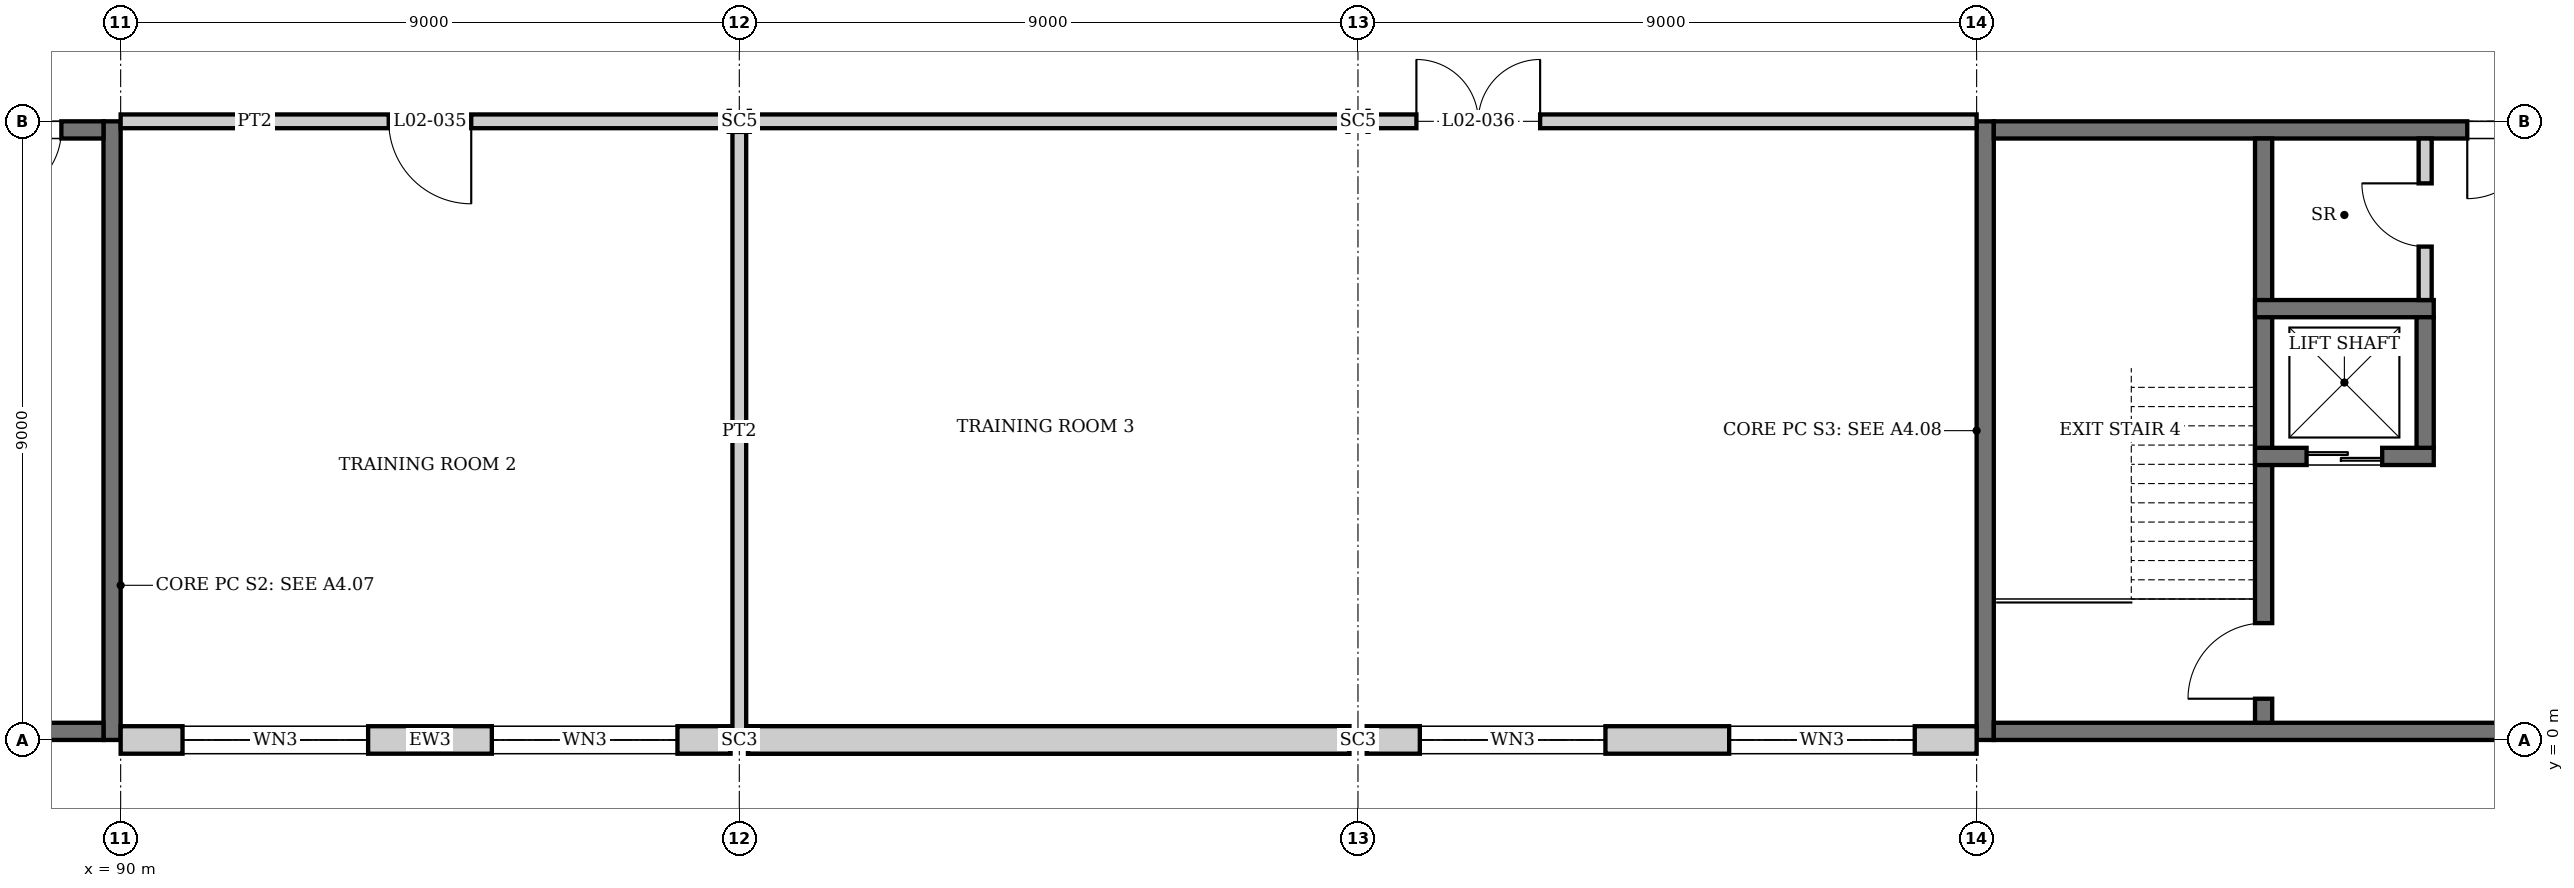
"""IFC4 building model, lengths in metres.
Left out: names, types, materials, properties, quantities, classifications, styles, units other than length and angle.
Written with IfcOpenShell. Run it as: python <this file> out.ifc"""

import sys

from ifc_helpers import new_model, si_unit, direction, frame, frame_2d, origin, origin_2d, place, context, subcontext, project, spatial, polyline, rectangle, i_section, outline, extrude, element, fill, save


model = new_model("IFC4")
c1 = context("Model", 3, precision=1e-05, world=origin(), true_north=direction((0.0, 1.0)))
c2 = subcontext(c1, "Body", "Model", "MODEL_VIEW")
j1 = project(units=[si_unit("LENGTHUNIT", "METRE"), si_unit("PLANEANGLEUNIT", "RADIAN")], contexts=[c1])
p1 = place(None, origin())
s1 = spatial("IfcSite", under=j1, at=p1, CompositionType="ELEMENT")
p2 = place(p1, origin())
s2 = spatial("IfcBuilding", under=s1, at=p2, CompositionType="ELEMENT")
p3 = place(p2, frame((0.0, 0.0, 10.5)))
s3 = spatial("IfcBuildingStorey", under=s2, at=p3, CompositionType="ELEMENT", Elevation=10.5)
p4 = place(p3, frame((99.0, 0.0, 0.0), z_axis=(0.0, 0.0, 1.0), x_axis=(0.0, 1.0, 0.0)))
e1 = element("IfcColumn", 1, at=p4, inside=s3, PredefinedType="COLUMN", context=c2, shape_type="SweptSolid", body=[
    extrude(i_section(OverallWidth=0.254, OverallDepth=0.254, WebThickness=0.009, FlangeThickness=0.014, at=origin_2d()), origin(), (0.0, 0.0, 1.0), 4.5),
])
p5 = place(p3, frame((99.0, 9.0, 0.0), z_axis=(0.0, 0.0, 1.0), x_axis=(0.0, 1.0, 0.0)))
e2 = element("IfcColumn", 2, at=p5, inside=s3, PredefinedType="COLUMN", context=c2, shape_type="SweptSolid", body=[
    extrude(i_section(OverallWidth=0.305, OverallDepth=0.308, WebThickness=0.01, FlangeThickness=0.015, at=origin_2d()), origin(), (0.0, 0.0, 1.0), 4.5),
])
p6 = place(p3, frame((108.0, 0.0, 0.0), z_axis=(0.0, 0.0, 1.0), x_axis=(0.0, 1.0, 0.0)))
e3 = element("IfcColumn", 3, at=p6, inside=s3, PredefinedType="COLUMN", context=c2, shape_type="SweptSolid", body=[
    extrude(i_section(OverallWidth=0.254, OverallDepth=0.254, WebThickness=0.009, FlangeThickness=0.014, at=origin_2d()), origin(), (0.0, 0.0, 1.0), 4.5),
])
p7 = place(p3, frame((108.0, 9.0, 0.0), z_axis=(0.0, 0.0, 1.0), x_axis=(0.0, 1.0, 0.0)))
e4 = element("IfcColumn", 4, at=p7, inside=s3, PredefinedType="COLUMN", context=c2, shape_type="SweptSolid", body=[
    extrude(i_section(OverallWidth=0.305, OverallDepth=0.308, WebThickness=0.01, FlangeThickness=0.015, at=origin_2d()), origin(), (0.0, 0.0, 1.0), 4.5),
])
p8 = place(p3, frame((89.875, 0.0, 0.0), z_axis=(0.0, 0.0, 1.0), x_axis=(0.0, 1.0, 0.0)))
e5 = element("IfcWall", 5, at=p8, inside=s3, PredefinedType="SHEAR", context=c2, shape_type="SweptSolid", body=[
    extrude(rectangle(XDim=9.0, YDim=0.25, at=frame_2d((4.5, 0.0))), origin(), (0.0, 0.0, 1.0), 4.35),
])
p9 = place(p3, frame((81.25, 0.125, 0.0), z_axis=(0.0, 0.0, 1.0), x_axis=(1.0, 0.0, 0.0)))
e6 = element("IfcWall", 6, at=p9, inside=s3, PredefinedType="SHEAR", context=c2, shape_type="SweptSolid", body=[
    extrude(rectangle(XDim=8.5, YDim=0.25, at=frame_2d((4.25, 0.0))), origin(), (0.0, 0.0, 1.0), 4.35),
])
p10 = place(p3, frame((81.25, 8.875, 0.0), z_axis=(0.0, 0.0, 1.0), x_axis=(1.0, 0.0, 0.0)))
e7 = element("IfcWall", 7, at=p10, inside=s3, PredefinedType="SHEAR", context=c2, shape_type="SweptSolid", body=[
    extrude(rectangle(XDim=8.5, YDim=0.25, at=frame_2d((4.25, 0.0))), origin(), (0.0, 0.0, 1.0), 4.35),
])
p11 = place(p10, frame((6.887, 0.0, 0.0)))
e8 = element("IfcOpeningElement", 8, at=p11, cuts=e7, PredefinedType="OPENING", context=c2, shape_type="SweptSolid", body=[
    extrude(rectangle(XDim=1.0, YDim=2.1, at=frame_2d((0.5, 1.05))), frame((0.0, 0.135, 0.0), z_axis=(0.0, -1.0, 0.0), x_axis=(1.0, 0.0, 0.0)), (0.0, 0.0, 1.0), 0.27),
])
p12 = place(p3, frame((117.125, 0.0, 0.0), z_axis=(0.0, 0.0, 1.0), x_axis=(0.0, 1.0, 0.0)))
e9 = element("IfcWall", 9, at=p12, inside=s3, PredefinedType="SHEAR", context=c2, shape_type="SweptSolid", body=[
    extrude(rectangle(XDim=9.0, YDim=0.25, at=frame_2d((4.5, 0.0))), origin(), (0.0, 0.0, 1.0), 4.35),
])
p13 = place(p3, frame((117.25, 0.125, 0.0), z_axis=(0.0, 0.0, 1.0), x_axis=(1.0, 0.0, 0.0)))
e10 = element("IfcWall", 10, at=p13, inside=s3, PredefinedType="SHEAR", context=c2, shape_type="SweptSolid", body=[
    extrude(rectangle(XDim=8.5, YDim=0.25, at=frame_2d((4.25, 0.0))), origin(), (0.0, 0.0, 1.0), 4.35),
])
p14 = place(p3, frame((117.25, 8.875, 0.0), z_axis=(0.0, 0.0, 1.0), x_axis=(1.0, 0.0, 0.0)))
e11 = element("IfcWall", 11, at=p14, inside=s3, PredefinedType="SHEAR", context=c2, shape_type="SweptSolid", body=[
    extrude(rectangle(XDim=8.5, YDim=0.25, at=frame_2d((4.25, 0.0))), origin(), (0.0, 0.0, 1.0), 4.35),
])
p15 = place(p14, frame((6.887, 0.0, 0.0)))
e12 = element("IfcOpeningElement", 12, at=p15, cuts=e11, PredefinedType="OPENING", context=c2, shape_type="SweptSolid", body=[
    extrude(rectangle(XDim=1.0, YDim=2.1, at=frame_2d((0.5, 1.05))), frame((0.0, 0.135, 0.0), z_axis=(0.0, -1.0, 0.0), x_axis=(1.0, 0.0, 0.0)), (0.0, 0.0, 1.0), 0.27),
])
p16 = place(p3, frame((90.0, 0.0, 0.0), z_axis=(0.0, 0.0, 1.0), x_axis=(1.0, 0.0, 0.0)))
e13 = element("IfcWall", 13, at=p16, inside=s3, PredefinedType="SOLIDWALL", context=c2, shape_type="SweptSolid", body=[
    extrude(rectangle(XDim=8.873, YDim=0.4, at=frame_2d((4.437, 0.0))), origin(), (0.0, 0.0, 1.0), 3.991),
])
p17 = place(p16, frame((0.9, 0.0, 1.5)))
e14 = element("IfcOpeningElement", 14, at=p17, cuts=e13, PredefinedType="OPENING", context=c2, shape_type="SweptSolid", body=[
    extrude(rectangle(XDim=2.7, YDim=1.5, at=frame_2d((1.35, 0.75))), frame((0.0, 0.21, 0.0), z_axis=(0.0, -1.0, 0.0), x_axis=(1.0, 0.0, 0.0)), (0.0, 0.0, 1.0), 0.42),
])
p18 = place(p16, frame((5.4, 0.0, 1.5)))
e15 = element("IfcOpeningElement", 15, at=p18, cuts=e13, PredefinedType="OPENING", context=c2, shape_type="SweptSolid", body=[
    extrude(rectangle(XDim=2.7, YDim=1.5, at=frame_2d((1.35, 0.75))), frame((0.0, 0.21, 0.0), z_axis=(0.0, -1.0, 0.0), x_axis=(1.0, 0.0, 0.0)), (0.0, 0.0, 1.0), 0.42),
])
p19 = place(p3, frame((99.127, 0.0, 0.0), z_axis=(0.0, 0.0, 1.0), x_axis=(1.0, 0.0, 0.0)))
e16 = element("IfcWall", 16, at=p19, inside=s3, PredefinedType="SOLIDWALL", context=c2, shape_type="SweptSolid", body=[
    extrude(outline(polyline([(8.746, 0.0), (0.0, 0.0), (0.0, 0.5), (0.048, 0.38), (8.746, 3.86), (8.746, 0.0)])), frame((0.0, 0.2, 0.0), z_axis=(0.0, -1.0, 0.0), x_axis=(1.0, 0.0, 0.0)), (0.0, 0.0, 1.0), 0.4),
])
p20 = place(p3, frame((99.127, 0.0, 0.0), z_axis=(0.0, 0.0, 1.0), x_axis=(1.0, 0.0, 0.0)))
e17 = element("IfcWall", 17, at=p20, inside=s3, PredefinedType="SOLIDWALL", context=c2, shape_type="SweptSolid", body=[
    extrude(outline(polyline([(0.0, 3.991), (8.375, 3.991), (0.0, 0.64), (0.0, 3.991)])), frame((0.0, 0.2, 0.0), z_axis=(0.0, -1.0, 0.0), x_axis=(1.0, 0.0, 0.0)), (0.0, 0.0, 1.0), 0.4),
])
p21 = place(p3, frame((108.127, 0.0, 0.0), z_axis=(0.0, 0.0, 1.0), x_axis=(1.0, 0.0, 0.0)))
e18 = element("IfcWall", 18, at=p21, inside=s3, PredefinedType="SOLIDWALL", context=c2, shape_type="SweptSolid", body=[
    extrude(rectangle(XDim=8.873, YDim=0.4, at=frame_2d((4.437, 0.0))), origin(), (0.0, 0.0, 1.0), 3.991),
])
p22 = place(p21, frame((0.773, 0.0, 1.5)))
e19 = element("IfcOpeningElement", 19, at=p22, cuts=e18, PredefinedType="OPENING", context=c2, shape_type="SweptSolid", body=[
    extrude(rectangle(XDim=2.7, YDim=1.5, at=frame_2d((1.35, 0.75))), frame((0.0, 0.21, 0.0), z_axis=(0.0, -1.0, 0.0), x_axis=(1.0, 0.0, 0.0)), (0.0, 0.0, 1.0), 0.42),
])
p23 = place(p21, frame((5.273, 0.0, 1.5)))
e20 = element("IfcOpeningElement", 20, at=p23, cuts=e18, PredefinedType="OPENING", context=c2, shape_type="SweptSolid", body=[
    extrude(rectangle(XDim=2.7, YDim=1.5, at=frame_2d((1.35, 0.75))), frame((0.0, 0.21, 0.0), z_axis=(0.0, -1.0, 0.0), x_axis=(1.0, 0.0, 0.0)), (0.0, 0.0, 1.0), 0.42),
])
p24 = place(p3, frame((121.175, 0.25, 0.0), z_axis=(0.0, 0.0, 1.0), x_axis=(0.0, 1.0, 0.0)))
e21 = element("IfcWall", 21, at=p24, inside=s3, PredefinedType="SOLIDWALL", context=c2, shape_type="SweptSolid", body=[
    extrude(rectangle(XDim=8.5, YDim=0.25, at=frame_2d((4.25, 0.0))), origin(), (0.0, 0.0, 1.0), 4.35),
])
p25 = place(p24, frame((0.35, 0.0, 0.0)))
e22 = element("IfcOpeningElement", 22, at=p25, cuts=e21, PredefinedType="OPENING", context=c2, shape_type="SweptSolid", body=[
    extrude(rectangle(XDim=1.1, YDim=2.1, at=frame_2d((0.55, 1.05))), frame((0.0, 0.135, 0.0), z_axis=(0.0, -1.0, 0.0), x_axis=(1.0, 0.0, 0.0)), (0.0, 0.0, 1.0), 0.27),
])
p26 = place(p3, frame((121.05, 4.125, 0.0), z_axis=(0.0, 0.0, 1.0), x_axis=(1.0, 0.0, 0.0)))
e23 = element("IfcWall", 23, at=p26, inside=s3, PredefinedType="SOLIDWALL", context=c2, shape_type="SweptSolid", body=[
    extrude(rectangle(XDim=2.6, YDim=0.25, at=frame_2d((1.3, 0.0))), origin(), (0.0, 0.0, 1.0), 4.35),
])
p27 = place(p26, frame((0.75, 0.0, 0.0)))
e24 = element("IfcOpeningElement", 24, at=p27, cuts=e23, PredefinedType="OPENING", context=c2, shape_type="SweptSolid", body=[
    extrude(rectangle(XDim=1.1, YDim=2.1, at=frame_2d((0.55, 1.05))), frame((0.0, 0.135, 0.0), z_axis=(0.0, -1.0, 0.0), x_axis=(1.0, 0.0, 0.0)), (0.0, 0.0, 1.0), 0.27),
])
p28 = place(p3, frame((121.05, 6.275, 0.0), z_axis=(0.0, 0.0, 1.0), x_axis=(1.0, 0.0, 0.0)))
e25 = element("IfcWall", 25, at=p28, inside=s3, PredefinedType="SOLIDWALL", context=c2, shape_type="SweptSolid", body=[
    extrude(rectangle(XDim=2.6, YDim=0.25, at=frame_2d((1.3, 0.0))), origin(), (0.0, 0.0, 1.0), 4.35),
])
p29 = place(p3, frame((123.525, 4.25, 0.0), z_axis=(0.0, 0.0, 1.0), x_axis=(0.0, 1.0, 0.0)))
e26 = element("IfcWall", 26, at=p29, inside=s3, PredefinedType="SOLIDWALL", context=c2, shape_type="SweptSolid", body=[
    extrude(rectangle(XDim=1.9, YDim=0.25, at=frame_2d((0.95, 0.0))), origin(), (0.0, 0.0, 1.0), 4.35),
])
p30 = place(p3, frame((90.0, 9.0, 0.0), z_axis=(0.0, 0.0, 1.0), x_axis=(1.0, 0.0, 0.0)))
e27 = element("IfcWall", 27, at=p30, inside=s3, PredefinedType="PARTITIONING", context=c2, shape_type="SweptSolid", body=[
    extrude(rectangle(XDim=8.846, YDim=0.2, at=frame_2d((4.423, 0.0))), origin(), (0.0, 0.0, 1.0), 2.414),
])
p31 = place(p30, frame((3.9, 0.0, 0.0)))
e28 = element("IfcOpeningElement", 28, at=p31, cuts=e27, PredefinedType="OPENING", context=c2, shape_type="SweptSolid", body=[
    extrude(rectangle(XDim=1.2, YDim=2.1, at=frame_2d((0.6, 1.05))), frame((0.0, 0.11, 0.0), z_axis=(0.0, -1.0, 0.0), x_axis=(1.0, 0.0, 0.0)), (0.0, 0.0, 1.0), 0.22),
])
p32 = place(p3, frame((99.154, 9.0, 0.0), z_axis=(0.0, 0.0, 1.0), x_axis=(1.0, 0.0, 0.0)))
e29 = element("IfcWall", 29, at=p32, inside=s3, PredefinedType="PARTITIONING", context=c2, shape_type="SweptSolid", body=[
    extrude(rectangle(XDim=8.692, YDim=0.2, at=frame_2d((4.346, 0.0))), origin(), (0.0, 0.0, 1.0), 2.414),
])
p33 = place(p3, frame((108.154, 9.0, 0.0), z_axis=(0.0, 0.0, 1.0), x_axis=(1.0, 0.0, 0.0)))
e30 = element("IfcWall", 30, at=p33, inside=s3, PredefinedType="PARTITIONING", context=c2, shape_type="SweptSolid", body=[
    extrude(rectangle(XDim=8.846, YDim=0.2, at=frame_2d((4.423, 0.0))), origin(), (0.0, 0.0, 1.0), 2.414),
])
p34 = place(p33, frame((0.696, 0.0, 0.0)))
e31 = element("IfcOpeningElement", 31, at=p34, cuts=e30, PredefinedType="OPENING", context=c2, shape_type="SweptSolid", body=[
    extrude(rectangle(XDim=1.8, YDim=2.1, at=frame_2d((0.9, 1.05))), frame((0.0, 0.11, 0.0), z_axis=(0.0, -1.0, 0.0), x_axis=(1.0, 0.0, 0.0)), (0.0, 0.0, 1.0), 0.22),
])
p35 = place(p3, frame((99.0, 0.127, 0.0), z_axis=(0.0, 0.0, 1.0), x_axis=(0.0, 1.0, 0.0)))
e32 = element("IfcWall", 32, at=p35, inside=s3, PredefinedType="PARTITIONING", context=c2, shape_type="SweptSolid", body=[
    extrude(rectangle(XDim=8.719, YDim=0.2, at=frame_2d((4.359, 0.0))), origin(), (0.0, 0.0, 1.0), 3.998),
])
p36 = place(p3, frame((123.525, 6.4, 0.0), z_axis=(0.0, 0.0, 1.0), x_axis=(0.0, 1.0, 0.0)))
e33 = element("IfcWall", 33, at=p36, inside=s3, PredefinedType="PARTITIONING", context=c2, shape_type="SweptSolid", body=[
    extrude(rectangle(XDim=2.35, YDim=0.19, at=frame_2d((1.175, 0.0))), origin(), (0.0, 0.0, 1.0), 4.35),
])
p37 = place(p36, frame((0.778, 0.0, 0.0)))
e34 = element("IfcOpeningElement", 34, at=p37, cuts=e33, PredefinedType="OPENING", context=c2, shape_type="SweptSolid", body=[
    extrude(rectangle(XDim=0.92, YDim=2.1, at=frame_2d((0.46, 1.05))), frame((0.0, 0.105, 0.0), z_axis=(0.0, -1.0, 0.0), x_axis=(1.0, 0.0, 0.0)), (0.0, 0.0, 1.0), 0.21),
])
p38 = place(p17, origin())
e35 = element("IfcWindow", 35, at=p38, inside=s3, PartitioningType="SINGLE_PANEL", PredefinedType="WINDOW", context=c2, shape_type="SweptSolid", body=[
    extrude(rectangle(XDim=2.7, YDim=1.5, at=frame_2d((1.35, 0.75))), frame((0.0, 0.03, 0.0), z_axis=(0.0, -1.0, 0.0), x_axis=(1.0, 0.0, 0.0)), (0.0, 0.0, 1.0), 0.06),
])
fill(e14, e35)
p39 = place(p18, origin())
e36 = element("IfcWindow", 36, at=p39, inside=s3, PartitioningType="SINGLE_PANEL", PredefinedType="WINDOW", context=c2, shape_type="SweptSolid", body=[
    extrude(rectangle(XDim=2.7, YDim=1.5, at=frame_2d((1.35, 0.75))), frame((0.0, 0.03, 0.0), z_axis=(0.0, -1.0, 0.0), x_axis=(1.0, 0.0, 0.0)), (0.0, 0.0, 1.0), 0.06),
])
fill(e15, e36)
p40 = place(p22, origin())
e37 = element("IfcWindow", 37, at=p40, inside=s3, PartitioningType="SINGLE_PANEL", PredefinedType="WINDOW", context=c2, shape_type="SweptSolid", body=[
    extrude(rectangle(XDim=2.7, YDim=1.5, at=frame_2d((1.35, 0.75))), frame((0.0, 0.03, 0.0), z_axis=(0.0, -1.0, 0.0), x_axis=(1.0, 0.0, 0.0)), (0.0, 0.0, 1.0), 0.06),
])
fill(e19, e37)
p41 = place(p23, origin())
e38 = element("IfcWindow", 38, at=p41, inside=s3, PartitioningType="SINGLE_PANEL", PredefinedType="WINDOW", context=c2, shape_type="SweptSolid", body=[
    extrude(rectangle(XDim=2.7, YDim=1.5, at=frame_2d((1.35, 0.75))), frame((0.0, 0.03, 0.0), z_axis=(0.0, -1.0, 0.0), x_axis=(1.0, 0.0, 0.0)), (0.0, 0.0, 1.0), 0.06),
])
fill(e20, e38)
p42 = place(p27, origin())
e39 = element("IfcDoor", 39, at=p42, inside=s3, OperationType="DOUBLE_DOOR_SLIDING", PredefinedType="DOOR", context=c2, shape_type="SweptSolid", body=[
    extrude(rectangle(XDim=1.1, YDim=2.1, at=frame_2d((0.55, 1.05))), frame((0.0, 0.025, 0.0), z_axis=(0.0, -1.0, 0.0), x_axis=(1.0, 0.0, 0.0)), (0.0, 0.0, 1.0), 0.05),
])
fill(e24, e39)
p43 = place(p11, frame((1.0, 0.0, 0.0), z_axis=(0.0, 0.0, 1.0), x_axis=(-1.0, 0.0, 0.0)))
e40 = element("IfcDoor", 40, at=p43, inside=s3, OperationType="SINGLE_SWING_RIGHT", PredefinedType="DOOR", context=c2, shape_type="SweptSolid", body=[
    extrude(rectangle(XDim=1.0, YDim=2.1, at=frame_2d((0.5, 1.05))), frame((0.0, 0.025, 0.0), z_axis=(0.0, -1.0, 0.0), x_axis=(1.0, 0.0, 0.0)), (0.0, 0.0, 1.0), 0.05),
])
fill(e8, e40)
p44 = place(p25, origin())
e41 = element("IfcDoor", 41, at=p44, inside=s3, OperationType="SINGLE_SWING_LEFT", PredefinedType="DOOR", context=c2, shape_type="SweptSolid", body=[
    extrude(rectangle(XDim=1.1, YDim=2.1, at=frame_2d((0.55, 1.05))), frame((0.0, 0.025, 0.0), z_axis=(0.0, -1.0, 0.0), x_axis=(1.0, 0.0, 0.0)), (0.0, 0.0, 1.0), 0.05),
])
fill(e22, e41)
p45 = place(p15, frame((1.0, 0.0, 0.0), z_axis=(0.0, 0.0, 1.0), x_axis=(-1.0, 0.0, 0.0)))
e42 = element("IfcDoor", 42, at=p45, inside=s3, OperationType="SINGLE_SWING_RIGHT", PredefinedType="DOOR", context=c2, shape_type="SweptSolid", body=[
    extrude(rectangle(XDim=1.0, YDim=2.1, at=frame_2d((0.5, 1.05))), frame((0.0, 0.025, 0.0), z_axis=(0.0, -1.0, 0.0), x_axis=(1.0, 0.0, 0.0)), (0.0, 0.0, 1.0), 0.05),
])
fill(e12, e42)
p46 = place(p37, origin())
e43 = element("IfcDoor", 43, at=p46, inside=s3, OperationType="SINGLE_SWING_RIGHT", PredefinedType="DOOR", context=c2, shape_type="SweptSolid", body=[
    extrude(rectangle(XDim=0.92, YDim=2.1, at=frame_2d((0.46, 1.05))), frame((0.0, 0.025, 0.0), z_axis=(0.0, -1.0, 0.0), x_axis=(1.0, 0.0, 0.0)), (0.0, 0.0, 1.0), 0.05),
])
fill(e34, e43)
p47 = place(p31, frame((1.2, 0.0, 0.0), z_axis=(0.0, 0.0, 1.0), x_axis=(-1.0, 0.0, 0.0)))
e44 = element("IfcDoor", 44, at=p47, inside=s3, OperationType="SINGLE_SWING_LEFT", PredefinedType="DOOR", context=c2, shape_type="SweptSolid", body=[
    extrude(rectangle(XDim=1.2, YDim=2.1, at=frame_2d((0.6, 1.05))), frame((0.0, 0.025, 0.0), z_axis=(0.0, -1.0, 0.0), x_axis=(1.0, 0.0, 0.0)), (0.0, 0.0, 1.0), 0.05),
])
fill(e28, e44)
p48 = place(p34, origin())
e45 = element("IfcDoor", 45, at=p48, inside=s3, OperationType="DOUBLE_DOOR_SINGLE_SWING", PredefinedType="DOOR", context=c2, shape_type="SweptSolid", body=[
    extrude(rectangle(XDim=1.8, YDim=2.1, at=frame_2d((0.9, 1.05))), frame((0.0, 0.025, 0.0), z_axis=(0.0, -1.0, 0.0), x_axis=(1.0, 0.0, 0.0)), (0.0, 0.0, 1.0), 0.05),
])
fill(e31, e45)
save(model, sys.argv[1])
